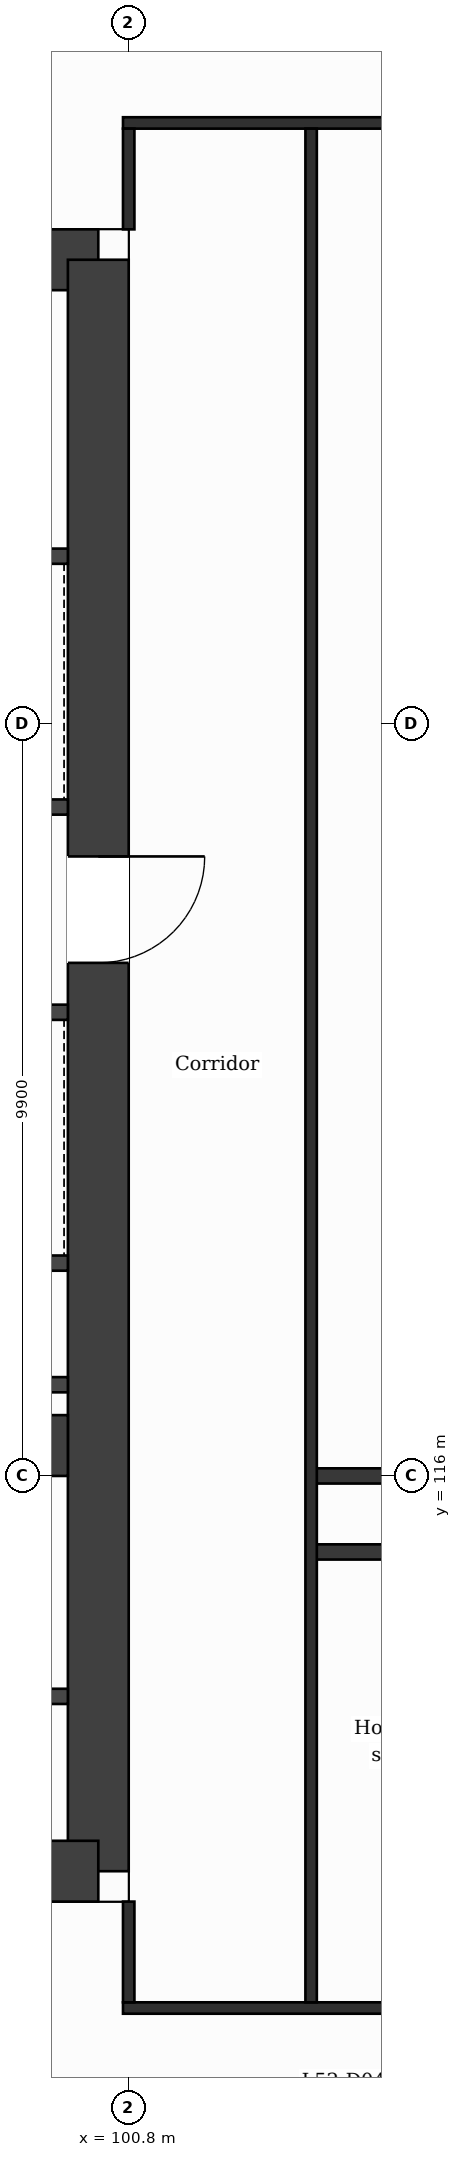
"""IFC4 building model, lengths in metres.
Left out: names, types, materials, properties, quantities, classifications, styles, units other than length and angle.
Written with IfcOpenShell. Run it as: python <this file> out.ifc"""

import sys

from ifc_helpers import new_model, si_unit, direction, frame, frame_2d, origin, place, context, subcontext, project, spatial, rectangle, extrude, element, fill, save


model = new_model("IFC4")
c1 = context("Model", 3, precision=1e-05, world=origin(), true_north=direction((0.0, 1.0)))
c2 = subcontext(c1, "Body", "Model", "MODEL_VIEW")
j1 = project(units=[si_unit("LENGTHUNIT", "METRE"), si_unit("PLANEANGLEUNIT", "RADIAN")], contexts=[c1])
p1 = place(None, origin())
s1 = spatial("IfcSite", under=j1, at=p1, CompositionType="ELEMENT")
p2 = place(p1, origin())
s2 = spatial("IfcBuilding", under=s1, at=p2, CompositionType="ELEMENT")
p3 = place(p2, frame((0.0, 0.0, 217.0)))
s3 = spatial("IfcBuildingStorey", under=s2, at=p3, CompositionType="ELEMENT", Elevation=217.0)
p4 = place(p3, frame((88.98, 132.0, 0.0), z_axis=(0.0, 0.0, 1.0), x_axis=(1.0, 0.0, 0.0)))
e1 = element("IfcWall", 1, at=p4, inside=s3, PredefinedType="SHEAR", context=c2, shape_type="SweptSolid", body=[
    extrude(rectangle(XDim=11.419, YDim=0.8, at=frame_2d((5.71, 0.0))), origin(), (0.0, 0.0, 1.0), 3.7),
])
p5 = place(p4, frame((6.833, 0.0, 0.0)))
e2 = element("IfcOpeningElement", 2, at=p5, cuts=e1, PredefinedType="OPENING", context=c2, shape_type="SweptSolid", body=[
    extrude(rectangle(XDim=1.2, YDim=2.1, at=frame_2d((0.6, 1.05))), frame((0.0, 0.41, 0.0), z_axis=(0.0, -1.0, 0.0), x_axis=(1.0, 0.0, 0.0)), (0.0, 0.0, 1.0), 0.82),
])
p6 = place(p3, frame((100.4, 132.0, 0.0), z_axis=(0.0, 0.0, 1.0), x_axis=(0.0, -1.0, 0.0)))
e3 = element("IfcWall", 3, at=p6, inside=s3, PredefinedType="SHEAR", context=c2, shape_type="SweptSolid", body=[
    extrude(rectangle(XDim=21.2, YDim=0.8, at=frame_2d((10.6, 0.0))), origin(), (0.0, 0.0, 1.0), 3.7),
])
p7 = place(p6, frame((7.85, 0.0, 0.0)))
e4 = element("IfcOpeningElement", 4, at=p7, cuts=e3, PredefinedType="OPENING", context=c2, shape_type="SweptSolid", body=[
    extrude(rectangle(XDim=1.4, YDim=2.1, at=frame_2d((0.7, 1.05))), frame((0.0, 0.41, 0.0), z_axis=(0.0, -1.0, 0.0), x_axis=(1.0, 0.0, 0.0)), (0.0, 0.0, 1.0), 0.82),
])
p8 = place(p3, frame((100.4, 110.8, 0.0), z_axis=(0.0, 0.0, 1.0), x_axis=(-1.0, 0.0, 0.0)))
e5 = element("IfcWall", 5, at=p8, inside=s3, PredefinedType="SHEAR", context=c2, shape_type="SweptSolid", body=[
    extrude(rectangle(XDim=14.273, YDim=0.8, at=frame_2d((7.137, 0.0))), origin(), (0.0, 0.0, 1.0), 3.7),
])
p9 = place(p8, frame((5.908, 0.0, 0.0)))
e6 = element("IfcOpeningElement", 6, at=p9, cuts=e5, PredefinedType="OPENING", context=c2, shape_type="SweptSolid", body=[
    extrude(rectangle(XDim=1.4, YDim=2.1, at=frame_2d((0.7, 1.05))), frame((0.0, 0.41, 0.0), z_axis=(0.0, -1.0, 0.0), x_axis=(1.0, 0.0, 0.0)), (0.0, 0.0, 1.0), 0.82),
])
p10 = place(p3, frame((94.7, 116.4, 0.0), z_axis=(0.0, 0.0, 1.0), x_axis=(1.0, 0.0, 0.0)))
e7 = element("IfcWall", 7, at=p10, inside=s3, PredefinedType="SHEAR", context=c2, shape_type="SweptSolid", body=[
    extrude(rectangle(XDim=5.3, YDim=0.8, at=frame_2d((2.65, 0.0))), origin(), (0.0, 0.0, 1.0), 3.7),
])
p11 = place(p3, frame((100.725, 109.0, 0.0), z_axis=(0.0, 0.0, 1.0), x_axis=(1.0, 0.0, 0.0)))
e8 = element("IfcWall", 8, at=p11, inside=s3, PredefinedType="PARTITIONING", context=c2, shape_type="SweptSolid", body=[
    extrude(rectangle(XDim=25.35, YDim=0.15, at=frame_2d((12.675, 0.0))), origin(), (0.0, 0.0, 1.0), 3.38),
])
p12 = place(p11, frame((6.15, 0.0, 0.0)))
e9 = element("IfcOpeningElement", 9, at=p12, cuts=e8, PredefinedType="OPENING", context=c2, shape_type="SweptSolid", body=[
    extrude(rectangle(XDim=1.0, YDim=2.1, at=frame_2d((0.5, 1.05))), frame((0.0, 0.085, 0.0), z_axis=(0.0, -1.0, 0.0), x_axis=(1.0, 0.0, 0.0)), (0.0, 0.0, 1.0), 0.17),
])
p13 = place(p11, frame((3.475, 0.0, 0.0)))
e10 = element("IfcOpeningElement", 10, at=p13, cuts=e8, PredefinedType="OPENING", context=c2, shape_type="SweptSolid", body=[
    extrude(rectangle(XDim=1.0, YDim=2.1, at=frame_2d((0.5, 1.05))), frame((0.0, 0.085, 0.0), z_axis=(0.0, -1.0, 0.0), x_axis=(1.0, 0.0, 0.0)), (0.0, 0.0, 1.0), 0.17),
])
p14 = place(p11, frame((12.175, 0.0, 0.0)))
e11 = element("IfcOpeningElement", 11, at=p14, cuts=e8, PredefinedType="OPENING", context=c2, shape_type="SweptSolid", body=[
    extrude(rectangle(XDim=1.0, YDim=2.1, at=frame_2d((0.5, 1.05))), frame((0.0, 0.085, 0.0), z_axis=(0.0, -1.0, 0.0), x_axis=(1.0, 0.0, 0.0)), (0.0, 0.0, 1.0), 0.17),
])
p15 = place(p11, frame((20.45, 0.0, 0.0)))
e12 = element("IfcOpeningElement", 12, at=p15, cuts=e8, PredefinedType="OPENING", context=c2, shape_type="SweptSolid", body=[
    extrude(rectangle(XDim=1.0, YDim=2.1, at=frame_2d((0.5, 1.05))), frame((0.0, 0.085, 0.0), z_axis=(0.0, -1.0, 0.0), x_axis=(1.0, 0.0, 0.0)), (0.0, 0.0, 1.0), 0.17),
])
p16 = place(p3, frame((95.127, 113.1, 0.0), z_axis=(0.0, 0.0, 1.0), x_axis=(1.0, 0.0, 0.0)))
e13 = element("IfcWall", 13, at=p16, inside=s3, PredefinedType="PARTITIONING", context=c2, shape_type="SweptSolid", body=[
    extrude(rectangle(XDim=4.873, YDim=0.2, at=frame_2d((2.437, 0.0))), origin(), (0.0, 0.0, 1.0), 3.38),
])
p17 = place(p16, frame((2.037, 0.0, 0.0)))
e14 = element("IfcOpeningElement", 14, at=p17, cuts=e13, PredefinedType="OPENING", context=c2, shape_type="SweptSolid", body=[
    extrude(rectangle(XDim=0.9, YDim=2.1, at=frame_2d((0.45, 1.05))), frame((0.0, 0.11, 0.0), z_axis=(0.0, -1.0, 0.0), x_axis=(1.0, 0.0, 0.0)), (0.0, 0.0, 1.0), 0.22),
])
p18 = place(p3, frame((103.2, 115.0, 0.0), z_axis=(0.0, 0.0, 1.0), x_axis=(1.0, 0.0, 0.0)))
e15 = element("IfcWall", 15, at=p18, inside=s3, PredefinedType="PARTITIONING", context=c2, shape_type="SweptSolid", body=[
    extrude(rectangle(XDim=3.1, YDim=0.2, at=frame_2d((1.55, 0.0))), origin(), (0.0, 0.0, 1.0), 3.38),
])
p19 = place(p3, frame((103.2, 116.0, 0.0), z_axis=(0.0, 0.0, 1.0), x_axis=(1.0, 0.0, 0.0)))
e16 = element("IfcWall", 16, at=p19, inside=s3, PredefinedType="PARTITIONING", context=c2, shape_type="SweptSolid", body=[
    extrude(rectangle(XDim=6.0, YDim=0.2, at=frame_2d((3.0, 0.0))), origin(), (0.0, 0.0, 1.0), 3.38),
])
for number, where, z_axis, x_axis in (
    (17, (95.227, 117.2, 0.0), (0.0, 0.0, 1.0), (1.0, 0.0, 0.0)),
    (18, (95.227, 118.8, 0.0), (0.0, 0.0, 1.0), (1.0, 0.0, 0.0)),
):
    element("IfcWall", number, at=place(p3, frame(where, z_axis=z_axis, x_axis=x_axis)), inside=s3, PredefinedType="PARTITIONING", context=c2, shape_type="SweptSolid", body=[
        extrude(rectangle(XDim=4.773, YDim=0.2, at=frame_2d((2.386, 0.0))), origin(), (0.0, 0.0, 1.0), 3.38),
    ])
p20 = place(p3, frame((95.227, 122.1, 0.0), z_axis=(0.0, 0.0, 1.0), x_axis=(1.0, 0.0, 0.0)))
e19 = element("IfcWall", 19, at=p20, inside=s3, PredefinedType="PARTITIONING", context=c2, shape_type="SweptSolid", body=[
    extrude(rectangle(XDim=4.773, YDim=0.2, at=frame_2d((2.386, 0.0))), origin(), (0.0, 0.0, 1.0), 3.38),
])
p21 = place(p20, frame((0.497, 0.0, 0.0)))
e20 = element("IfcOpeningElement", 20, at=p21, cuts=e19, PredefinedType="OPENING", context=c2, shape_type="SweptSolid", body=[
    extrude(rectangle(XDim=1.1, YDim=2.1, at=frame_2d((0.55, 1.05))), frame((0.0, 0.11, 0.0), z_axis=(0.0, -1.0, 0.0), x_axis=(1.0, 0.0, 0.0)), (0.0, 0.0, 1.0), 0.22),
])
p22 = place(p20, frame((3.176, 0.0, 0.0)))
e21 = element("IfcOpeningElement", 21, at=p22, cuts=e19, PredefinedType="OPENING", context=c2, shape_type="SweptSolid", body=[
    extrude(rectangle(XDim=1.1, YDim=2.1, at=frame_2d((0.55, 1.05))), frame((0.0, 0.11, 0.0), z_axis=(0.0, -1.0, 0.0), x_axis=(1.0, 0.0, 0.0)), (0.0, 0.0, 1.0), 0.22),
])
p23 = place(p3, frame((92.702, 124.8, 0.0), z_axis=(0.0, 0.0, 1.0), x_axis=(1.0, 0.0, 0.0)))
e22 = element("IfcWall", 22, at=p23, inside=s3, PredefinedType="PARTITIONING", context=c2, shape_type="SweptSolid", body=[
    extrude(rectangle(XDim=7.298, YDim=0.2, at=frame_2d((3.649, 0.0))), origin(), (0.0, 0.0, 1.0), 3.38),
])
p24 = place(p23, frame((5.7, 0.0, 0.0)))
e23 = element("IfcOpeningElement", 23, at=p24, cuts=e22, PredefinedType="OPENING", context=c2, shape_type="SweptSolid", body=[
    extrude(rectangle(XDim=1.1, YDim=2.1, at=frame_2d((0.55, 1.05))), frame((0.0, 0.11, 0.0), z_axis=(0.0, -1.0, 0.0), x_axis=(1.0, 0.0, 0.0)), (0.0, 0.0, 1.0), 0.22),
])
p25 = place(p3, frame((92.827, 128.1, 0.0), z_axis=(0.0, 0.0, 1.0), x_axis=(1.0, 0.0, 0.0)))
e24 = element("IfcWall", 24, at=p25, inside=s3, PredefinedType="PARTITIONING", context=c2, shape_type="SweptSolid", body=[
    extrude(rectangle(XDim=7.173, YDim=0.2, at=frame_2d((3.586, 0.0))), origin(), (0.0, 0.0, 1.0), 3.38),
])
p26 = place(p25, frame((3.184, 0.0, 0.0)))
e25 = element("IfcOpeningElement", 25, at=p26, cuts=e24, PredefinedType="OPENING", context=c2, shape_type="SweptSolid", body=[
    extrude(rectangle(XDim=1.1, YDim=2.1, at=frame_2d((0.55, 1.05))), frame((0.0, 0.11, 0.0), z_axis=(0.0, -1.0, 0.0), x_axis=(1.0, 0.0, 0.0)), (0.0, 0.0, 1.0), 0.22),
])
p27 = place(p3, frame((100.725, 133.8, 0.0), z_axis=(0.0, 0.0, 1.0), x_axis=(1.0, 0.0, 0.0)))
e26 = element("IfcWall", 26, at=p27, inside=s3, PredefinedType="PARTITIONING", context=c2, shape_type="SweptSolid", body=[
    extrude(rectangle(XDim=25.35, YDim=0.15, at=frame_2d((12.675, 0.0))), origin(), (0.0, 0.0, 1.0), 3.38),
])
p28 = place(p27, frame((4.545, 0.0, 0.0)))
e27 = element("IfcOpeningElement", 27, at=p28, cuts=e26, PredefinedType="OPENING", context=c2, shape_type="SweptSolid", body=[
    extrude(rectangle(XDim=1.0, YDim=2.1, at=frame_2d((0.5, 1.05))), frame((0.0, 0.085, 0.0), z_axis=(0.0, -1.0, 0.0), x_axis=(1.0, 0.0, 0.0)), (0.0, 0.0, 1.0), 0.17),
])
p29 = place(p27, frame((12.845, 0.0, 0.0)))
e28 = element("IfcOpeningElement", 28, at=p29, cuts=e26, PredefinedType="OPENING", context=c2, shape_type="SweptSolid", body=[
    extrude(rectangle(XDim=1.0, YDim=2.1, at=frame_2d((0.5, 1.05))), frame((0.0, 0.085, 0.0), z_axis=(0.0, -1.0, 0.0), x_axis=(1.0, 0.0, 0.0)), (0.0, 0.0, 1.0), 0.17),
])
p30 = place(p27, frame((20.45, 0.0, 0.0)))
e29 = element("IfcOpeningElement", 29, at=p30, cuts=e26, PredefinedType="OPENING", context=c2, shape_type="SweptSolid", body=[
    extrude(rectangle(XDim=1.0, YDim=2.1, at=frame_2d((0.5, 1.05))), frame((0.0, 0.085, 0.0), z_axis=(0.0, -1.0, 0.0), x_axis=(1.0, 0.0, 0.0)), (0.0, 0.0, 1.0), 0.17),
])
p31 = place(p3, frame((100.8, 109.075, 0.0), z_axis=(0.0, 0.0, 1.0), x_axis=(0.0, 1.0, 0.0)))
e30 = element("IfcWall", 30, at=p31, inside=s3, PredefinedType="PARTITIONING", context=c2, shape_type="SweptSolid", body=[
    extrude(rectangle(XDim=1.325, YDim=0.15, at=frame_2d((0.663, 0.0))), origin(), (0.0, 0.0, 1.0), 3.38),
])
p32 = place(p3, frame((100.8, 132.4, 0.0), z_axis=(0.0, 0.0, 1.0), x_axis=(0.0, 1.0, 0.0)))
e31 = element("IfcWall", 31, at=p32, inside=s3, PredefinedType="PARTITIONING", context=c2, shape_type="SweptSolid", body=[
    extrude(rectangle(XDim=1.325, YDim=0.15, at=frame_2d((0.663, 0.0))), origin(), (0.0, 0.0, 1.0), 3.38),
])
p33 = place(p3, frame((103.2, 109.075, 0.0), z_axis=(0.0, 0.0, 1.0), x_axis=(0.0, 1.0, 0.0)))
e32 = element("IfcWall", 32, at=p33, inside=s3, PredefinedType="PARTITIONING", context=c2, shape_type="SweptSolid", body=[
    extrude(rectangle(XDim=24.65, YDim=0.15, at=frame_2d((12.325, 0.0))), origin(), (0.0, 0.0, 1.0), 3.38),
])
p34 = place(p7, origin())
e33 = element("IfcDoor", 33, at=p34, inside=s3, OperationType="SINGLE_SWING_LEFT", PredefinedType="DOOR", context=c2, shape_type="SweptSolid", body=[
    extrude(rectangle(XDim=1.4, YDim=2.1, at=frame_2d((0.7, 1.05))), frame((0.0, 0.025, 0.0), z_axis=(0.0, -1.0, 0.0), x_axis=(1.0, 0.0, 0.0)), (0.0, 0.0, 1.0), 0.05),
])
fill(e4, e33)
save(model, sys.argv[1])
